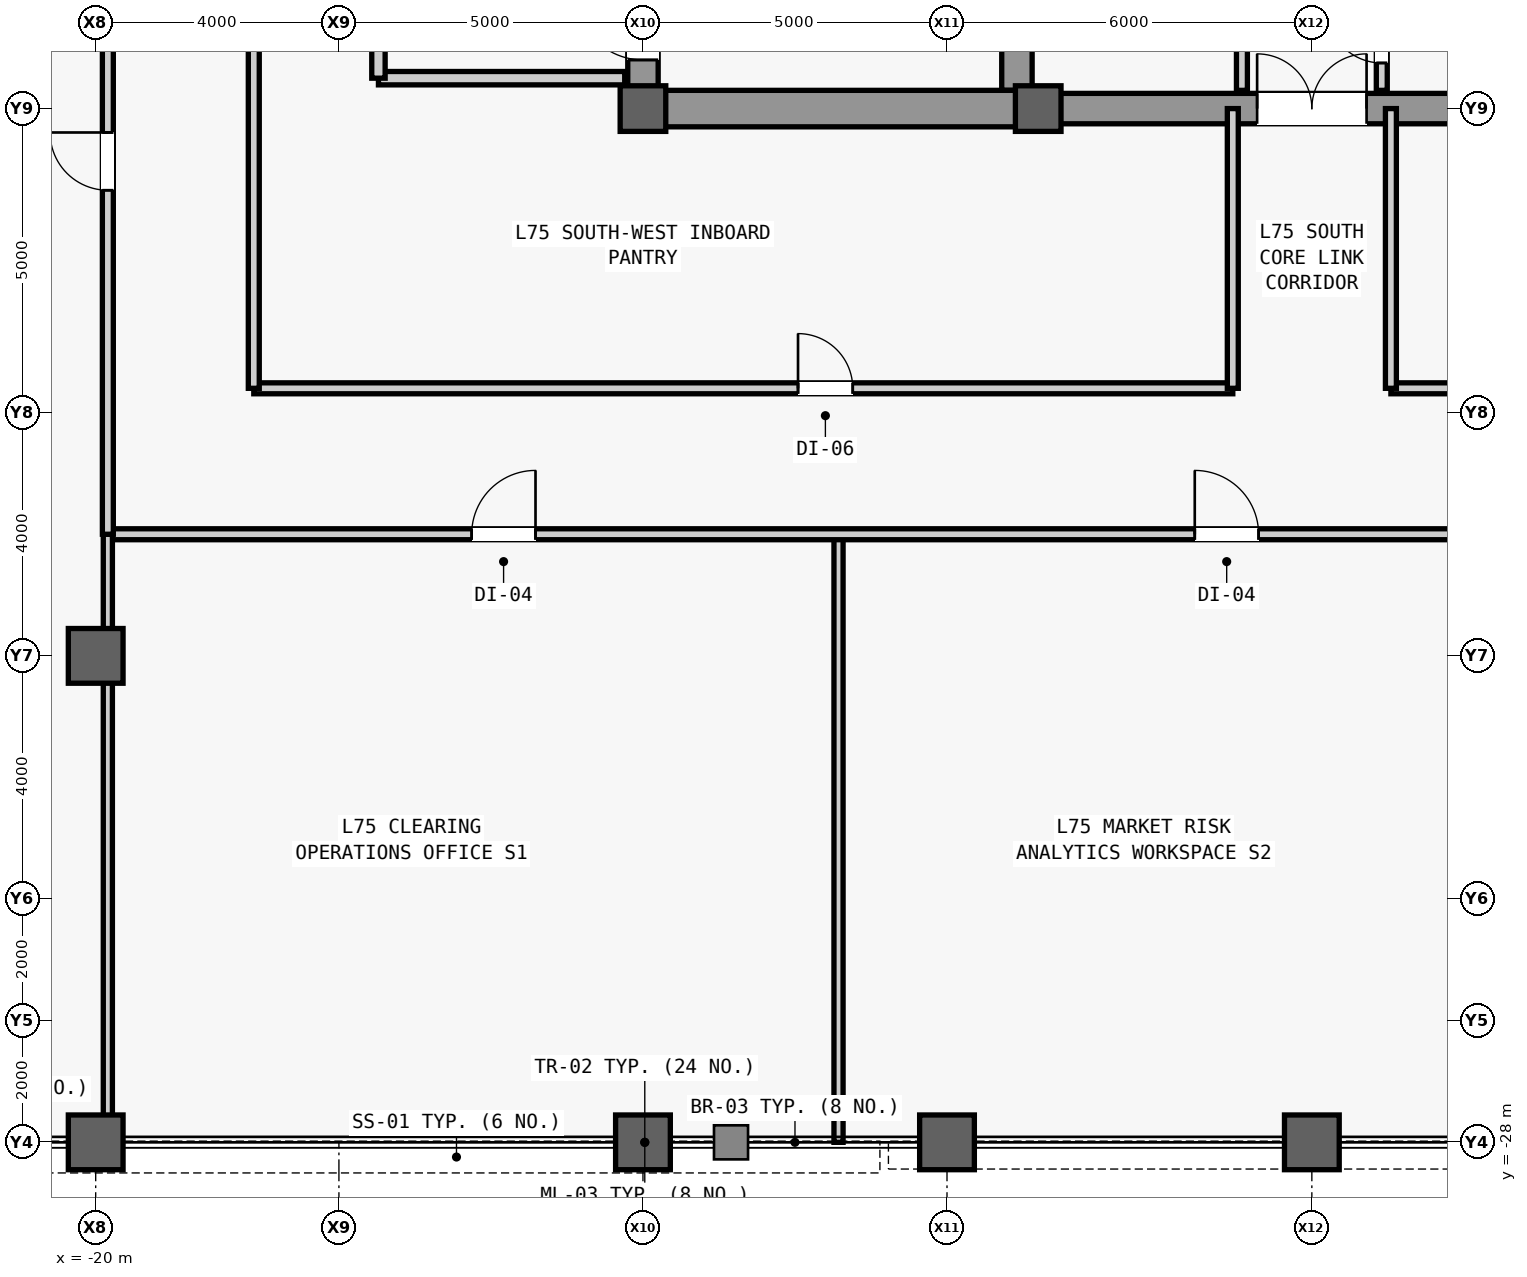
"""IFC4 building model, lengths in metres.
Left out: names, types, materials, properties, quantities, classifications, styles, units other than length and angle.
Written with IfcOpenShell. Run it as: python <this file> out.ifc"""

import sys

from ifc_helpers import new_model, si_unit, direction, frame, frame_2d, origin, origin_2d, place, context, subcontext, project, spatial, rectangle, hollow_rectangle, extrude, source, transform, mapped, element, fill, save


model = new_model("IFC4")
c1 = context("Model", 3, precision=1e-05, world=origin(), true_north=direction((0.0, 1.0)))
c2 = subcontext(c1, "Body", "Model", "MODEL_VIEW")
j1 = project(units=[si_unit("LENGTHUNIT", "METRE"), si_unit("PLANEANGLEUNIT", "RADIAN")], contexts=[c1])
p1 = place(None, origin())
s1 = spatial("IfcSite", under=j1, at=p1, CompositionType="ELEMENT")
p2 = place(p1, origin())
s2 = spatial("IfcBuilding", under=s1, at=p2, CompositionType="ELEMENT")
p3 = place(p2, frame((0.0, 0.0, 317.5)))
s3 = spatial("IfcBuildingStorey", under=s2, at=p3, CompositionType="ELEMENT", Elevation=317.5)
m1 = source(origin(), c2, "Body", "SweptSolid", [
    extrude(rectangle(XDim=22.0, YDim=0.5, at=frame_2d((11.0, 0.0))), origin(), (0.0, 0.0, 1.0), 3.78),
])
p4 = place(p3, frame((-11.0, -11.0, 0.0), z_axis=(0.0, 0.0, 1.0), x_axis=(0.0, 1.0, 0.0)))
e1 = element("IfcWall", 1, at=p4, inside=s3, PredefinedType="SHEAR", context=c2, shape_type="MappedRepresentation", body=[
    mapped(m1, transform((0.0, 0.0, 0.0), scale=1.0)),
])
m2 = source(origin(), c2, "Body", "SweptSolid", [
    extrude(rectangle(XDim=1.1, YDim=2.2, at=frame_2d((0.55, 1.1))), frame((0.0, 0.26, 0.0), z_axis=(0.0, -1.0, 0.0), x_axis=(1.0, 0.0, 0.0)), (0.0, 0.0, 1.0), 0.52),
])
p5 = place(p4, frame((0.8, 0.0, 0.0)))
e2 = element("IfcOpeningElement", 2, at=p5, cuts=e1, PredefinedType="OPENING", context=c2, shape_type="MappedRepresentation", body=[
    mapped(m2, transform((0.0, 0.0, 0.0), scale=1.0)),
])
p6 = place(p4, frame((12.5, 0.0, 0.0)))
e3 = element("IfcOpeningElement", 3, at=p6, cuts=e1, PredefinedType="OPENING", context=c2, shape_type="MappedRepresentation", body=[
    mapped(m2, transform((0.0, 0.0, 0.0), scale=1.0)),
])
m3 = source(origin(), c2, "Body", "SweptSolid", [
    extrude(rectangle(XDim=0.9, YDim=2.15, at=frame_2d((0.45, 1.075))), frame((0.0, 0.26, 0.0), z_axis=(0.0, -1.0, 0.0), x_axis=(1.0, 0.0, 0.0)), (0.0, 0.0, 1.0), 0.52),
])
p7 = place(p4, frame((6.2, 0.0, 0.0)))
e4 = element("IfcOpeningElement", 4, at=p7, cuts=e1, PredefinedType="OPENING", context=c2, shape_type="MappedRepresentation", body=[
    mapped(m3, transform((0.0, 0.0, 0.0), scale=1.0)),
])
p8 = place(p4, frame((8.05, 0.0, 0.0)))
e5 = element("IfcOpeningElement", 5, at=p8, cuts=e1, PredefinedType="OPENING", context=c2, shape_type="MappedRepresentation", body=[
    mapped(m3, transform((0.0, 0.0, 0.0), scale=1.0)),
])
m4 = source(origin(), c2, "Body", "SweptSolid", [
    extrude(rectangle(XDim=1.2, YDim=2.3, at=frame_2d((0.6, 1.15))), frame((0.0, 0.26, 0.0), z_axis=(0.0, -1.0, 0.0), x_axis=(1.0, 0.0, 0.0)), (0.0, 0.0, 1.0), 0.52),
])
p9 = place(p4, frame((14.6, 0.0, 0.0)))
e6 = element("IfcOpeningElement", 6, at=p9, cuts=e1, PredefinedType="OPENING", context=c2, shape_type="MappedRepresentation", body=[
    mapped(m4, transform((0.0, 0.0, 0.0), scale=1.0)),
])
p10 = place(p4, frame((18.2, 0.0, 0.0)))
e7 = element("IfcOpeningElement", 7, at=p10, cuts=e1, PredefinedType="OPENING", context=c2, shape_type="MappedRepresentation", body=[
    mapped(m4, transform((0.0, 0.0, 0.0), scale=1.0)),
])
m5 = source(origin(), c2, "Body", "SweptSolid", [
    extrude(rectangle(XDim=1.3, YDim=2.3, at=frame_2d((0.65, 1.15))), frame((0.0, 0.26, 0.0), z_axis=(0.0, -1.0, 0.0), x_axis=(1.0, 0.0, 0.0)), (0.0, 0.0, 1.0), 0.52),
])
p11 = place(p4, frame((2.7, 0.0, 0.0)))
e8 = element("IfcOpeningElement", 8, at=p11, cuts=e1, PredefinedType="OPENING", context=c2, shape_type="MappedRepresentation", body=[
    mapped(m5, transform((0.0, 0.0, 0.0), scale=1.0)),
])
m6 = source(origin(), c2, "Body", "SweptSolid", [
    extrude(rectangle(XDim=21.4, YDim=0.5, at=frame_2d((10.7, 0.0))), origin(), (0.0, 0.0, 1.0), 3.78),
])
p12 = place(p3, frame((-4.85, -10.7, 0.0), z_axis=(0.0, 0.0, 1.0), x_axis=(0.0, 1.0, 0.0)))
e9 = element("IfcWall", 9, at=p12, inside=s3, PredefinedType="SHEAR", context=c2, shape_type="MappedRepresentation", body=[
    mapped(m6, transform((0.0, 0.0, 0.0), scale=1.0)),
])
m7 = source(origin(), c2, "Body", "SweptSolid", [
    extrude(rectangle(XDim=5.9, YDim=0.6, at=frame_2d((2.95, 0.0))), origin(), (0.0, 0.0, 1.0), 3.78),
])
p13 = place(p3, frame((-10.75, -11.0, 0.0), z_axis=(0.0, 0.0, 1.0), x_axis=(1.0, 0.0, 0.0)))
e10 = element("IfcWall", 10, at=p13, inside=s3, PredefinedType="SHEAR", context=c2, shape_type="MappedRepresentation", body=[
    mapped(m7, transform((0.0, 0.0, 0.0), scale=1.0)),
])
m8 = source(origin(), c2, "Body", "SweptSolid", [
    extrude(rectangle(XDim=9.2, YDim=0.5, at=frame_2d((4.6, 0.0))), origin(), (0.0, 0.0, 1.0), 3.78),
])
p14 = place(p3, frame((-4.6, -11.0, 0.0), z_axis=(0.0, 0.0, 1.0), x_axis=(1.0, 0.0, 0.0)))
e11 = element("IfcWall", 11, at=p14, inside=s3, PredefinedType="SHEAR", context=c2, shape_type="MappedRepresentation", body=[
    mapped(m8, transform((0.0, 0.0, 0.0), scale=1.0)),
])
m9 = source(origin(), c2, "Body", "SweptSolid", [
    extrude(rectangle(XDim=1.8, YDim=2.25, at=frame_2d((0.9, 1.125))), frame((0.0, 0.26, 0.0), z_axis=(0.0, -1.0, 0.0), x_axis=(1.0, 0.0, 0.0)), (0.0, 0.0, 1.0), 0.52),
])
p15 = place(p14, frame((3.7, 0.0, 0.0)))
e12 = element("IfcOpeningElement", 12, at=p15, cuts=e11, PredefinedType="OPENING", context=c2, shape_type="MappedRepresentation", body=[
    mapped(m9, transform((0.0, 0.0, 0.0), scale=1.0)),
])
m10 = source(origin(), c2, "Body", "SweptSolid", [
    extrude(hollow_rectangle(XDim=0.9, YDim=0.9, WallThickness=0.05, at=origin_2d()), origin(), (0.0, 0.0, 1.0), 4.0),
])
for number, where, z_axis, x_axis in (
    (13, (-20.0, -28.0, 0.0), (0.0, 0.0, 1.0), (1.0, 0.0, 0.0)),
    (14, (-20.0, -20.0, 0.0), (0.0, 0.0, 1.0), (1.0, 0.0, 0.0)),
    (15, (-11.0, -28.0, 0.0), (0.0, 0.0, 1.0), (1.0, 0.0, 0.0)),
):
    element("IfcColumn", number, at=place(p3, frame(where, z_axis=z_axis, x_axis=x_axis)), inside=s3, PredefinedType="COLUMN", context=c2, shape_type="MappedRepresentation", body=[
        mapped(m10, transform((0.0, 0.0, 0.0), scale=1.0)),
    ])
m11 = source(origin(), c2, "Body", "SweptSolid", [
    extrude(rectangle(XDim=0.75, YDim=0.75, at=origin_2d()), origin(), (0.0, 0.0, 1.0), 4.0),
])
p16 = place(p3, frame((-11.0, -11.0, 0.0), z_axis=(0.0, 0.0, 1.0), x_axis=(1.0, 0.0, 0.0)))
e16 = element("IfcColumn", 16, at=p16, inside=s3, PredefinedType="COLUMN", context=c2, shape_type="MappedRepresentation", body=[
    mapped(m11, transform((0.0, 0.0, 0.0), scale=1.0)),
])
p17 = place(p3, frame((-6.0, -28.0, 0.0), z_axis=(0.0, 0.0, 1.0), x_axis=(1.0, 0.0, 0.0)))
e17 = element("IfcColumn", 17, at=p17, inside=s3, PredefinedType="COLUMN", context=c2, shape_type="MappedRepresentation", body=[
    mapped(m10, transform((0.0, 0.0, 0.0), scale=1.0)),
])
p18 = place(p3, frame((-4.5, -11.0, 0.0), z_axis=(0.0, 0.0, 1.0), x_axis=(1.0, 0.0, 0.0)))
e18 = element("IfcColumn", 18, at=p18, inside=s3, PredefinedType="COLUMN", context=c2, shape_type="MappedRepresentation", body=[
    mapped(m11, transform((0.0, 0.0, 0.0), scale=1.0)),
])
p19 = place(p3, frame((0.0, -28.0, 0.0), z_axis=(0.0, 0.0, 1.0), x_axis=(1.0, 0.0, 0.0)))
e19 = element("IfcColumn", 19, at=p19, inside=s3, PredefinedType="COLUMN", context=c2, shape_type="MappedRepresentation", body=[
    mapped(m10, transform((0.0, 0.0, 0.0), scale=1.0)),
])
m12 = source(origin(), c2, "Body", "SweptSolid", [
    extrude(rectangle(XDim=4.05, YDim=0.22, at=frame_2d((2.025, 0.0))), origin(), (0.0, 0.0, 1.0), 3.78),
])
p20 = place(p3, frame((-15.35, -10.5, 0.0), z_axis=(0.0, 0.0, 1.0), x_axis=(1.0, 0.0, 0.0)))
e20 = element("IfcWall", 20, at=p20, inside=s3, PredefinedType="PARTITIONING", context=c2, shape_type="MappedRepresentation", body=[
    mapped(m12, transform((0.0, 0.0, 0.0), scale=1.0)),
])
m13 = source(origin(), c2, "Body", "SweptSolid", [
    extrude(rectangle(XDim=4.4, YDim=0.22, at=frame_2d((2.2, 0.0))), origin(), (0.0, 0.0, 1.0), 3.78),
])
p21 = place(p3, frame((-15.35, -10.5, 0.0), z_axis=(0.0, 0.0, 1.0), x_axis=(0.0, 1.0, 0.0)))
e21 = element("IfcWall", 21, at=p21, inside=s3, PredefinedType="PARTITIONING", context=c2, shape_type="MappedRepresentation", body=[
    mapped(m13, transform((0.0, 0.0, 0.0), scale=1.0)),
])
m14 = source(origin(), c2, "Body", "SweptSolid", [
    extrude(rectangle(XDim=1.2, YDim=2.2, at=frame_2d((0.6, 1.1))), frame((0.0, 0.12, 0.0), z_axis=(0.0, -1.0, 0.0), x_axis=(1.0, 0.0, 0.0)), (0.0, 0.0, 1.0), 0.24),
])
p22 = place(p21, frame((1.6, 0.0, 0.0)))
e22 = element("IfcOpeningElement", 22, at=p22, cuts=e21, PredefinedType="OPENING", context=c2, shape_type="MappedRepresentation", body=[
    mapped(m14, transform((0.0, 0.0, 0.0), scale=1.0)),
])
m15 = source(origin(), c2, "Body", "SweptSolid", [
    extrude(rectangle(XDim=5.4, YDim=0.18, at=frame_2d((2.7, 0.0))), origin(), (0.0, 0.0, 1.0), 3.78),
])
p23 = place(p3, frame((-1.15, -10.7, 0.0), z_axis=(0.0, 0.0, 1.0), x_axis=(0.0, 1.0, 0.0)))
e23 = element("IfcWall", 23, at=p23, inside=s3, PredefinedType="PARTITIONING", context=c2, shape_type="MappedRepresentation", body=[
    mapped(m15, transform((0.0, 0.0, 0.0), scale=1.0)),
])
m16 = source(origin(), c2, "Body", "SweptSolid", [
    extrude(rectangle(XDim=0.9, YDim=2.15, at=frame_2d((0.45, 1.075))), frame((0.0, 0.1, 0.0), z_axis=(0.0, -1.0, 0.0), x_axis=(1.0, 0.0, 0.0)), (0.0, 0.0, 1.0), 0.2),
])
p24 = place(p23, frame((2.25, 0.0, 0.0)))
e24 = element("IfcOpeningElement", 24, at=p24, cuts=e23, PredefinedType="OPENING", context=c2, shape_type="MappedRepresentation", body=[
    mapped(m16, transform((0.0, 0.0, 0.0), scale=1.0)),
])
p25 = place(p3, frame((1.15, -10.7, 0.0), z_axis=(0.0, 0.0, 1.0), x_axis=(0.0, 1.0, 0.0)))
e25 = element("IfcWall", 25, at=p25, inside=s3, PredefinedType="PARTITIONING", context=c2, shape_type="MappedRepresentation", body=[
    mapped(m15, transform((0.0, 0.0, 0.0), scale=1.0)),
])
p26 = place(p25, frame((0.45, 0.0, 0.0)))
e26 = element("IfcOpeningElement", 26, at=p26, cuts=e25, PredefinedType="OPENING", context=c2, shape_type="MappedRepresentation", body=[
    mapped(m16, transform((0.0, 0.0, 0.0), scale=1.0)),
])
p27 = place(p25, frame((2.25, 0.0, 0.0)))
e27 = element("IfcOpeningElement", 27, at=p27, cuts=e25, PredefinedType="OPENING", context=c2, shape_type="MappedRepresentation", body=[
    mapped(m16, transform((0.0, 0.0, 0.0), scale=1.0)),
])
p28 = place(p25, frame((4.05, 0.0, 0.0)))
e28 = element("IfcOpeningElement", 28, at=p28, cuts=e25, PredefinedType="OPENING", context=c2, shape_type="MappedRepresentation", body=[
    mapped(m16, transform((0.0, 0.0, 0.0), scale=1.0)),
])
m17 = source(origin(), c2, "Body", "SweptSolid", [
    extrude(rectangle(XDim=16.1, YDim=0.18, at=frame_2d((8.05, 0.0))), origin(), (0.0, 0.0, 1.0), 3.78),
])
p29 = place(p3, frame((-17.4, -15.6, 0.0), z_axis=(0.0, 0.0, 1.0), x_axis=(1.0, 0.0, 0.0)))
e29 = element("IfcWall", 29, at=p29, inside=s3, PredefinedType="PARTITIONING", context=c2, shape_type="MappedRepresentation", body=[
    mapped(m17, transform((0.0, 0.0, 0.0), scale=1.0)),
])
p30 = place(p29, frame((8.95, 0.0, 0.0)))
e30 = element("IfcOpeningElement", 30, at=p30, cuts=e29, PredefinedType="OPENING", context=c2, shape_type="MappedRepresentation", body=[
    mapped(m16, transform((0.0, 0.0, 0.0), scale=1.0)),
])
m18 = source(origin(), c2, "Body", "SweptSolid", [
    extrude(rectangle(XDim=5.8, YDim=0.18, at=frame_2d((2.9, 0.0))), origin(), (0.0, 0.0, 1.0), 3.78),
])
p31 = place(p3, frame((-17.4, -15.6, 0.0), z_axis=(0.0, 0.0, 1.0), x_axis=(0.0, 1.0, 0.0)))
e31 = element("IfcWall", 31, at=p31, inside=s3, PredefinedType="PARTITIONING", context=c2, shape_type="MappedRepresentation", body=[
    mapped(m18, transform((0.0, 0.0, 0.0), scale=1.0)),
])
m19 = source(origin(), c2, "Body", "SweptSolid", [
    extrude(rectangle(XDim=4.6, YDim=0.18, at=frame_2d((2.3, 0.0))), origin(), (0.0, 0.0, 1.0), 3.78),
])
p32 = place(p3, frame((-1.3, -15.6, 0.0), z_axis=(0.0, 0.0, 1.0), x_axis=(0.0, 1.0, 0.0)))
e32 = element("IfcWall", 32, at=p32, inside=s3, PredefinedType="PARTITIONING", context=c2, shape_type="MappedRepresentation", body=[
    mapped(m19, transform((0.0, 0.0, 0.0), scale=1.0)),
])
m20 = source(origin(), c2, "Body", "SweptSolid", [
    extrude(rectangle(XDim=14.05, YDim=0.18, at=frame_2d((7.025, 0.0))), origin(), (0.0, 0.0, 1.0), 3.78),
])
p33 = place(p3, frame((1.3, -15.6, 0.0), z_axis=(0.0, 0.0, 1.0), x_axis=(1.0, 0.0, 0.0)))
e33 = element("IfcWall", 33, at=p33, inside=s3, PredefinedType="PARTITIONING", context=c2, shape_type="MappedRepresentation", body=[
    mapped(m20, transform((0.0, 0.0, 0.0), scale=1.0)),
])
p34 = place(p33, frame((6.25, 0.0, 0.0)))
e34 = element("IfcOpeningElement", 34, at=p34, cuts=e33, PredefinedType="OPENING", context=c2, shape_type="MappedRepresentation", body=[
    mapped(m16, transform((0.0, 0.0, 0.0), scale=1.0)),
])
p35 = place(p3, frame((1.3, -15.6, 0.0), z_axis=(0.0, 0.0, 1.0), x_axis=(0.0, 1.0, 0.0)))
e35 = element("IfcWall", 35, at=p35, inside=s3, PredefinedType="PARTITIONING", context=c2, shape_type="MappedRepresentation", body=[
    mapped(m19, transform((0.0, 0.0, 0.0), scale=1.0)),
])
m21 = source(origin(), c2, "Body", "SweptSolid", [
    extrude(rectangle(XDim=10.0, YDim=0.15, at=frame_2d((5.0, 0.0))), origin(), (0.0, 0.0, 1.0), 3.78),
])
p36 = place(p3, frame((-7.784, -28.0, 0.0), z_axis=(0.0, 0.0, 1.0), x_axis=(0.0, 1.0, 0.0)))
e36 = element("IfcWall", 36, at=p36, inside=s3, PredefinedType="PARTITIONING", context=c2, shape_type="MappedRepresentation", body=[
    mapped(m21, transform((0.0, 0.0, 0.0), scale=1.0)),
])
m22 = source(origin(), c2, "Body", "SweptSolid", [
    extrude(rectangle(XDim=37.55, YDim=0.18, at=frame_2d((18.775, 0.0))), origin(), (0.0, 0.0, 1.0), 3.78),
])
p37 = place(p3, frame((-19.8, -18.0, 0.0), z_axis=(0.0, 0.0, 1.0), x_axis=(1.0, 0.0, 0.0)))
e37 = element("IfcWall", 37, at=p37, inside=s3, PredefinedType="PARTITIONING", context=c2, shape_type="MappedRepresentation", body=[
    mapped(m22, transform((0.0, 0.0, 0.0), scale=1.0)),
])
m23 = source(origin(), c2, "Body", "SweptSolid", [
    extrude(rectangle(XDim=1.05, YDim=2.2, at=frame_2d((0.525, 1.1))), frame((0.0, 0.1, 0.0), z_axis=(0.0, -1.0, 0.0), x_axis=(1.0, 0.0, 0.0)), (0.0, 0.0, 1.0), 0.2),
])
p38 = place(p37, frame((5.983, 0.0, 0.0)))
e38 = element("IfcOpeningElement", 38, at=p38, cuts=e37, PredefinedType="OPENING", context=c2, shape_type="MappedRepresentation", body=[
    mapped(m23, transform((0.0, 0.0, 0.0), scale=1.0)),
])
p39 = place(p37, frame((17.875, 0.0, 0.0)))
e39 = element("IfcOpeningElement", 39, at=p39, cuts=e37, PredefinedType="OPENING", context=c2, shape_type="MappedRepresentation", body=[
    mapped(m23, transform((0.0, 0.0, 0.0), scale=1.0)),
])
p40 = place(p37, frame((30.116, 0.0, 0.0)))
e40 = element("IfcOpeningElement", 40, at=p40, cuts=e37, PredefinedType="OPENING", context=c2, shape_type="MappedRepresentation", body=[
    mapped(m23, transform((0.0, 0.0, 0.0), scale=1.0)),
])
m24 = source(origin(), c2, "Body", "SweptSolid", [
    extrude(rectangle(XDim=10.0, YDim=0.15, at=frame_2d((5.0, 0.0))), origin(), (0.0, 0.0, 1.0), 3.164),
])
p41 = place(p3, frame((-19.8, -28.0, 0.0), z_axis=(0.0, 0.0, 1.0), x_axis=(0.0, 1.0, 0.0)))
e41 = element("IfcWall", 41, at=p41, inside=s3, PredefinedType="PARTITIONING", context=c2, shape_type="MappedRepresentation", body=[
    mapped(m24, transform((0.0, 0.0, 0.0), scale=1.0)),
])
m25 = source(origin(), c2, "Body", "SweptSolid", [
    extrude(rectangle(XDim=40.5, YDim=0.18, at=frame_2d((20.25, 0.0))), origin(), (0.0, 0.0, 1.0), 3.164),
])
p42 = place(p3, frame((-19.8, -18.0, 0.0), z_axis=(0.0, 0.0, 1.0), x_axis=(0.0, 1.0, 0.0)))
e42 = element("IfcWall", 42, at=p42, inside=s3, PredefinedType="PARTITIONING", context=c2, shape_type="MappedRepresentation", body=[
    mapped(m25, transform((0.0, 0.0, 0.0), scale=1.0)),
])
m26 = source(origin(), c2, "Body", "SweptSolid", [
    extrude(rectangle(XDim=0.95, YDim=2.15, at=frame_2d((0.475, 1.075))), frame((0.0, 0.1, 0.0), z_axis=(0.0, -1.0, 0.0), x_axis=(1.0, 0.0, 0.0)), (0.0, 0.0, 1.0), 0.2),
])
p43 = place(p42, frame((5.657, 0.0, 0.0)))
e43 = element("IfcOpeningElement", 43, at=p43, cuts=e42, PredefinedType="OPENING", context=c2, shape_type="MappedRepresentation", body=[
    mapped(m26, transform((0.0, 0.0, 0.0), scale=1.0)),
])
p44 = place(p42, frame((13.157, 0.0, 0.0)))
e44 = element("IfcOpeningElement", 44, at=p44, cuts=e42, PredefinedType="OPENING", context=c2, shape_type="MappedRepresentation", body=[
    mapped(m26, transform((0.0, 0.0, 0.0), scale=1.0)),
])
p45 = place(p42, frame((21.893, 0.0, 0.0)))
e45 = element("IfcOpeningElement", 45, at=p45, cuts=e42, PredefinedType="OPENING", context=c2, shape_type="MappedRepresentation", body=[
    mapped(m26, transform((0.0, 0.0, 0.0), scale=1.0)),
])
p46 = place(p42, frame((29.393, 0.0, 0.0)))
e46 = element("IfcOpeningElement", 46, at=p46, cuts=e42, PredefinedType="OPENING", context=c2, shape_type="MappedRepresentation", body=[
    mapped(m26, transform((0.0, 0.0, 0.0), scale=1.0)),
])
m27 = source(origin(), c2, "Body", "SweptSolid", [
    extrude(rectangle(XDim=1.1, YDim=2.2, at=frame_2d((0.55, 1.1))), frame((0.0, 0.025, 0.0), z_axis=(0.0, -1.0, 0.0), x_axis=(1.0, 0.0, 0.0)), (0.0, 0.0, 1.0), 0.05),
])
p47 = place(p5, origin())
e47 = element("IfcDoor", 47, at=p47, inside=s3, OperationType="SINGLE_SWING_RIGHT", PredefinedType="DOOR", context=c2, shape_type="MappedRepresentation", body=[
    mapped(m27, transform((0.0, 0.0, 0.0), scale=1.0)),
])
fill(e2, e47)
m28 = source(origin(), c2, "Body", "SweptSolid", [
    extrude(rectangle(XDim=0.9, YDim=2.15, at=frame_2d((0.45, 1.075))), frame((0.0, 0.025, 0.0), z_axis=(0.0, -1.0, 0.0), x_axis=(1.0, 0.0, 0.0)), (0.0, 0.0, 1.0), 0.05),
])
p48 = place(p26, origin())
e48 = element("IfcDoor", 48, at=p48, inside=s3, OperationType="SINGLE_SWING_RIGHT", PredefinedType="DOOR", context=c2, shape_type="MappedRepresentation", body=[
    mapped(m28, transform((0.0, 0.0, 0.0), scale=1.0)),
])
fill(e26, e48)
m29 = source(origin(), c2, "Body", "SweptSolid", [
    extrude(rectangle(XDim=1.8, YDim=2.25, at=frame_2d((0.9, 1.125))), frame((0.0, 0.025, 0.0), z_axis=(0.0, -1.0, 0.0), x_axis=(1.0, 0.0, 0.0)), (0.0, 0.0, 1.0), 0.05),
])
p49 = place(p15, origin())
e49 = element("IfcDoor", 49, at=p49, inside=s3, OperationType="SINGLE_SWING_LEFT", PredefinedType="DOOR", context=c2, shape_type="MappedRepresentation", body=[
    mapped(m29, transform((0.0, 0.0, 0.0), scale=1.0)),
])
fill(e12, e49)
p50 = place(p30, origin())
e50 = element("IfcDoor", 50, at=p50, inside=s3, OperationType="SINGLE_SWING_LEFT", PredefinedType="DOOR", context=c2, shape_type="MappedRepresentation", body=[
    mapped(m28, transform((0.0, 0.0, 0.0), scale=1.0)),
])
fill(e30, e50)
m30 = source(origin(), c2, "Body", "SweptSolid", [
    extrude(rectangle(XDim=1.05, YDim=2.2, at=frame_2d((0.525, 1.1))), frame((0.0, 0.025, 0.0), z_axis=(0.0, -1.0, 0.0), x_axis=(1.0, 0.0, 0.0)), (0.0, 0.0, 1.0), 0.05),
])
p51 = place(p38, origin())
e51 = element("IfcDoor", 51, at=p51, inside=s3, OperationType="SINGLE_SWING_RIGHT", PredefinedType="DOOR", context=c2, shape_type="MappedRepresentation", body=[
    mapped(m30, transform((0.0, 0.0, 0.0), scale=1.0)),
])
fill(e38, e51)
p52 = place(p39, origin())
e52 = element("IfcDoor", 52, at=p52, inside=s3, OperationType="SINGLE_SWING_LEFT", PredefinedType="DOOR", context=c2, shape_type="MappedRepresentation", body=[
    mapped(m30, transform((0.0, 0.0, 0.0), scale=1.0)),
])
fill(e39, e52)
m31 = source(origin(), c2, "Body", "SweptSolid", [
    extrude(rectangle(XDim=0.95, YDim=2.15, at=frame_2d((0.475, 1.075))), frame((0.0, 0.025, 0.0), z_axis=(0.0, -1.0, 0.0), x_axis=(1.0, 0.0, 0.0)), (0.0, 0.0, 1.0), 0.05),
])
p53 = place(p43, origin())
e53 = element("IfcDoor", 53, at=p53, inside=s3, OperationType="SINGLE_SWING_RIGHT", PredefinedType="DOOR", context=c2, shape_type="MappedRepresentation", body=[
    mapped(m31, transform((0.0, 0.0, 0.0), scale=1.0)),
])
fill(e43, e53)
save(model, sys.argv[1])
